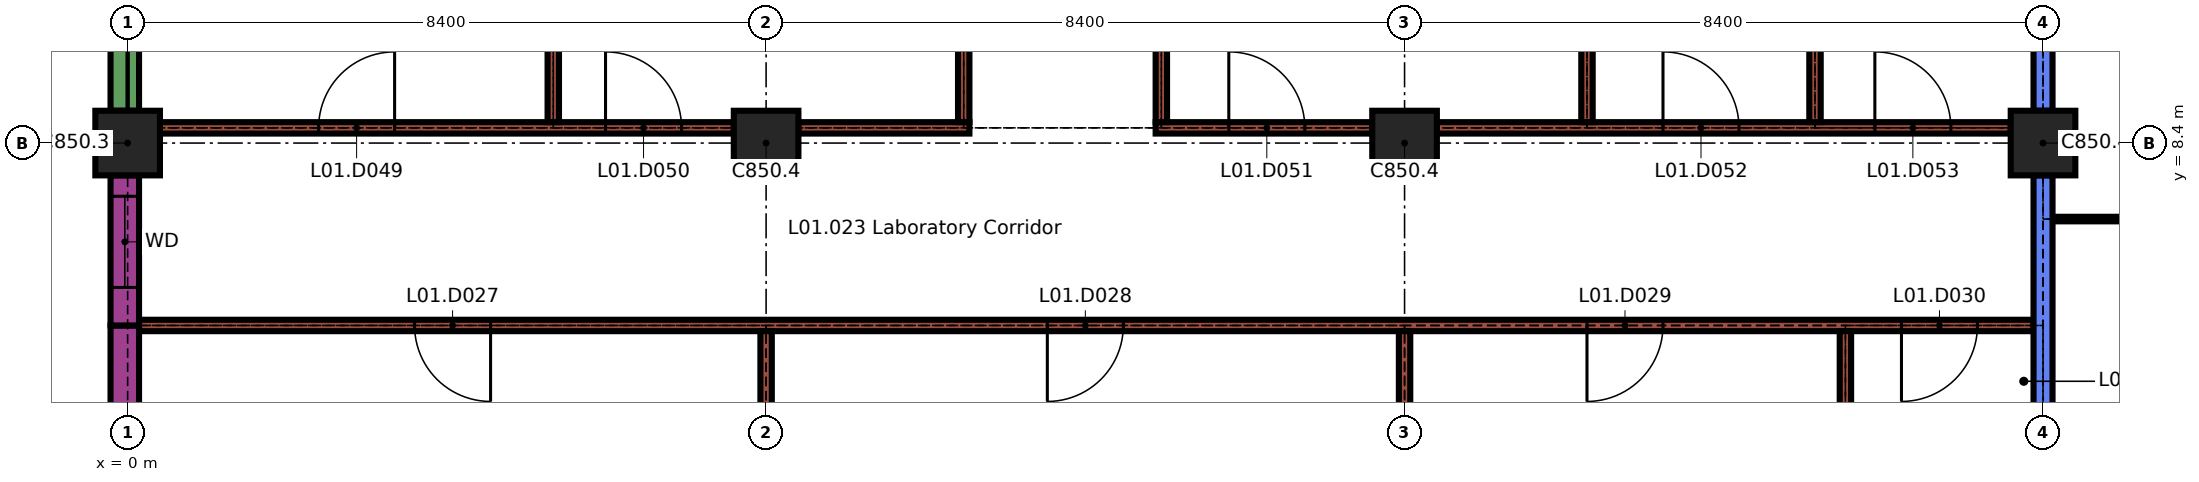
"""IFC4 building model, lengths in metres.
Left out: names, types, materials, properties, quantities, classifications, styles, units other than length and angle.
Written with IfcOpenShell. Run it as: python <this file> out.ifc"""

import sys

from ifc_helpers import new_model, si_unit, direction, frame, frame_2d, origin, origin_2d, place, context, subcontext, project, spatial, rectangle, extrude, element, fill, save


model = new_model("IFC4")
c1 = context("Model", 3, precision=1e-05, world=origin(), true_north=direction((0.0, 1.0)))
c2 = subcontext(c1, "Body", "Model", "MODEL_VIEW")
j1 = project(units=[si_unit("LENGTHUNIT", "METRE"), si_unit("PLANEANGLEUNIT", "RADIAN")], contexts=[c1])
p1 = place(None, origin())
s1 = spatial("IfcSite", under=j1, at=p1, CompositionType="ELEMENT")
p2 = place(p1, origin())
s2 = spatial("IfcBuilding", under=s1, at=p2, CompositionType="ELEMENT")
p3 = place(p2, frame((0.0, 0.0, 4.5)))
s3 = spatial("IfcBuildingStorey", under=s2, at=p3, CompositionType="ELEMENT", Elevation=4.5)
for number, where, z_axis, x_axis in (
    (1, (0.0, 8.4, 0.0), (0.0, 0.0, 1.0), (1.0, 0.0, 0.0)),
    (2, (8.4, 8.4, 0.0), (0.0, 0.0, 1.0), (1.0, 0.0, 0.0)),
    (3, (16.8, 8.4, 0.0), (0.0, 0.0, 1.0), (1.0, 0.0, 0.0)),
    (4, (25.2, 8.4, 0.0), (0.0, 0.0, 1.0), (1.0, 0.0, 0.0)),
):
    element("IfcColumn", number, at=place(p3, frame(where, z_axis=z_axis, x_axis=x_axis)), inside=s3, PredefinedType="COLUMN", context=c2, shape_type="SweptSolid", body=[
        extrude(rectangle(XDim=0.85, YDim=0.85, at=origin_2d()), origin(), (0.0, 0.0, 1.0), 3.45),
    ])
p4 = place(p3, frame((-0.038, 0.425, 0.0), z_axis=(0.0, 0.0, 1.0), x_axis=(0.0, 1.0, 0.0)))
e5 = element("IfcWall", 5, at=p4, inside=s3, PredefinedType="SOLIDWALL", context=c2, shape_type="SweptSolid", body=[
    extrude(rectangle(XDim=5.575, YDim=0.375, at=frame_2d((2.788, 0.0))), origin(), (0.0, 0.0, 1.0), 3.15),
])
p5 = place(p4, frame((0.275, 0.0, 1.0)))
e6 = element("IfcOpeningElement", 6, at=p5, cuts=e5, PredefinedType="OPENING", context=c2, shape_type="SweptSolid", body=[
    extrude(rectangle(XDim=2.8, YDim=1.2, at=frame_2d((1.4, 0.6))), frame((0.0, 0.198, 0.0), z_axis=(0.0, -1.0, 0.0), x_axis=(1.0, 0.0, 0.0)), (0.0, 0.0, 1.0), 0.395),
])
p6 = place(p3, frame((-0.038, 6.0, 0.0), z_axis=(0.0, 0.0, 1.0), x_axis=(0.0, 1.0, 0.0)))
e7 = element("IfcWall", 7, at=p6, inside=s3, PredefinedType="SOLIDWALL", context=c2, shape_type="SweptSolid", body=[
    extrude(rectangle(XDim=1.975, YDim=0.375, at=frame_2d((0.988, 0.0))), origin(), (0.0, 0.0, 1.0), 3.15),
])
p7 = place(p6, frame((0.5, 0.0, 0.9)))
e8 = element("IfcOpeningElement", 8, at=p7, cuts=e7, PredefinedType="OPENING", context=c2, shape_type="SweptSolid", body=[
    extrude(rectangle(XDim=1.2, YDim=1.5, at=frame_2d((0.6, 0.75))), frame((0.0, 0.198, 0.0), z_axis=(0.0, -1.0, 0.0), x_axis=(1.0, 0.0, 0.0)), (0.0, 0.0, 1.0), 0.395),
])
p8 = place(p3, frame((-0.038, 8.825, 0.0), z_axis=(0.0, 0.0, 1.0), x_axis=(0.0, 1.0, 0.0)))
e9 = element("IfcWall", 9, at=p8, inside=s3, PredefinedType="SOLIDWALL", context=c2, shape_type="SweptSolid", body=[
    extrude(rectangle(XDim=5.375, YDim=0.375, at=frame_2d((2.688, 0.0))), origin(), (0.0, 0.0, 1.0), 0.45),
])
p9 = place(p3, frame((0.15, 6.0, 0.0), z_axis=(0.0, 0.0, 1.0), x_axis=(1.0, 0.0, 0.0)))
e10 = element("IfcWall", 10, at=p9, inside=s3, PredefinedType="PARTITIONING", context=c2, shape_type="SweptSolid", body=[
    extrude(rectangle(XDim=24.925, YDim=0.15, at=frame_2d((12.462, 0.0))), origin(), (0.0, 0.0, 1.0), 3.45),
])
p10 = place(p9, frame((3.625, 0.0, 0.0)))
e11 = element("IfcOpeningElement", 11, at=p10, cuts=e10, PredefinedType="OPENING", context=c2, shape_type="SweptSolid", body=[
    extrude(rectangle(XDim=1.0, YDim=2.1, at=frame_2d((0.5, 1.05))), frame((0.0, 0.085, 0.0), z_axis=(0.0, -1.0, 0.0), x_axis=(1.0, 0.0, 0.0)), (0.0, 0.0, 1.0), 0.17),
])
p11 = place(p9, frame((11.95, 0.0, 0.0)))
e12 = element("IfcOpeningElement", 12, at=p11, cuts=e10, PredefinedType="OPENING", context=c2, shape_type="SweptSolid", body=[
    extrude(rectangle(XDim=1.0, YDim=2.1, at=frame_2d((0.5, 1.05))), frame((0.0, 0.085, 0.0), z_axis=(0.0, -1.0, 0.0), x_axis=(1.0, 0.0, 0.0)), (0.0, 0.0, 1.0), 0.17),
])
p12 = place(p9, frame((19.05, 0.0, 0.0)))
e13 = element("IfcOpeningElement", 13, at=p12, cuts=e10, PredefinedType="OPENING", context=c2, shape_type="SweptSolid", body=[
    extrude(rectangle(XDim=1.0, YDim=2.1, at=frame_2d((0.5, 1.05))), frame((0.0, 0.085, 0.0), z_axis=(0.0, -1.0, 0.0), x_axis=(1.0, 0.0, 0.0)), (0.0, 0.0, 1.0), 0.17),
])
p13 = place(p9, frame((23.188, 0.0, 0.0)))
e14 = element("IfcOpeningElement", 14, at=p13, cuts=e10, PredefinedType="OPENING", context=c2, shape_type="SweptSolid", body=[
    extrude(rectangle(XDim=1.0, YDim=2.1, at=frame_2d((0.5, 1.05))), frame((0.0, 0.085, 0.0), z_axis=(0.0, -1.0, 0.0), x_axis=(1.0, 0.0, 0.0)), (0.0, 0.0, 1.0), 0.17),
])
p14 = place(p3, frame((25.325, 7.4, 0.0), z_axis=(0.0, 0.0, 1.0), x_axis=(1.0, 0.0, 0.0)))
e15 = element("IfcWall", 15, at=p14, inside=s3, PredefinedType="PARTITIONING", context=c2, shape_type="SweptSolid", body=[
    extrude(rectangle(XDim=8.175, YDim=0.06, at=frame_2d((4.087, 0.0))), origin(), (0.0, 0.0, 1.0), 3.45),
])
p15 = place(p14, frame((3.587, 0.0, 0.0)))
e16 = element("IfcOpeningElement", 16, at=p15, cuts=e15, PredefinedType="OPENING", context=c2, shape_type="SweptSolid", body=[
    extrude(rectangle(XDim=1.0, YDim=2.1, at=frame_2d((0.5, 1.05))), frame((0.0, 0.04, 0.0), z_axis=(0.0, -1.0, 0.0), x_axis=(1.0, 0.0, 0.0)), (0.0, 0.0, 1.0), 0.08),
])
p16 = place(p3, frame((0.425, 8.6, 0.0), z_axis=(0.0, 0.0, 1.0), x_axis=(1.0, 0.0, 0.0)))
e17 = element("IfcWall", 17, at=p16, inside=s3, PredefinedType="PARTITIONING", context=c2, shape_type="SweptSolid", body=[
    extrude(rectangle(XDim=7.55, YDim=0.15, at=frame_2d((3.775, 0.0))), origin(), (0.0, 0.0, 1.0), 3.45),
])
p17 = place(p16, frame((2.087, 0.0, 0.0)))
e18 = element("IfcOpeningElement", 18, at=p17, cuts=e17, PredefinedType="OPENING", context=c2, shape_type="SweptSolid", body=[
    extrude(rectangle(XDim=1.0, YDim=2.1, at=frame_2d((0.5, 1.05))), frame((0.0, 0.085, 0.0), z_axis=(0.0, -1.0, 0.0), x_axis=(1.0, 0.0, 0.0)), (0.0, 0.0, 1.0), 0.17),
])
p18 = place(p16, frame((5.863, 0.0, 0.0)))
e19 = element("IfcOpeningElement", 19, at=p18, cuts=e17, PredefinedType="OPENING", context=c2, shape_type="SweptSolid", body=[
    extrude(rectangle(XDim=1.0, YDim=2.1, at=frame_2d((0.5, 1.05))), frame((0.0, 0.085, 0.0), z_axis=(0.0, -1.0, 0.0), x_axis=(1.0, 0.0, 0.0)), (0.0, 0.0, 1.0), 0.17),
])
p19 = place(p3, frame((8.825, 8.6, 0.0), z_axis=(0.0, 0.0, 1.0), x_axis=(1.0, 0.0, 0.0)))
e20 = element("IfcWall", 20, at=p19, inside=s3, PredefinedType="PARTITIONING", context=c2, shape_type="SweptSolid", body=[
    extrude(rectangle(XDim=2.25, YDim=0.15, at=frame_2d((1.125, 0.0))), origin(), (0.0, 0.0, 1.0), 3.45),
])
p20 = place(p3, frame((13.525, 8.6, 0.0), z_axis=(0.0, 0.0, 1.0), x_axis=(1.0, 0.0, 0.0)))
e21 = element("IfcWall", 21, at=p20, inside=s3, PredefinedType="PARTITIONING", context=c2, shape_type="SweptSolid", body=[
    extrude(rectangle(XDim=2.85, YDim=0.15, at=frame_2d((1.425, 0.0))), origin(), (0.0, 0.0, 1.0), 3.45),
])
p21 = place(p20, frame((0.962, 0.0, 0.0)))
e22 = element("IfcOpeningElement", 22, at=p21, cuts=e21, PredefinedType="OPENING", context=c2, shape_type="SweptSolid", body=[
    extrude(rectangle(XDim=1.0, YDim=2.1, at=frame_2d((0.5, 1.05))), frame((0.0, 0.085, 0.0), z_axis=(0.0, -1.0, 0.0), x_axis=(1.0, 0.0, 0.0)), (0.0, 0.0, 1.0), 0.17),
])
p22 = place(p3, frame((17.225, 8.6, 0.0), z_axis=(0.0, 0.0, 1.0), x_axis=(1.0, 0.0, 0.0)))
e23 = element("IfcWall", 23, at=p22, inside=s3, PredefinedType="PARTITIONING", context=c2, shape_type="SweptSolid", body=[
    extrude(rectangle(XDim=7.55, YDim=0.15, at=frame_2d((3.775, 0.0))), origin(), (0.0, 0.0, 1.0), 3.45),
])
p23 = place(p22, frame((2.975, 0.0, 0.0)))
e24 = element("IfcOpeningElement", 24, at=p23, cuts=e23, PredefinedType="OPENING", context=c2, shape_type="SweptSolid", body=[
    extrude(rectangle(XDim=1.0, YDim=2.1, at=frame_2d((0.5, 1.05))), frame((0.0, 0.085, 0.0), z_axis=(0.0, -1.0, 0.0), x_axis=(1.0, 0.0, 0.0)), (0.0, 0.0, 1.0), 0.17),
])
p24 = place(p22, frame((5.762, 0.0, 0.0)))
e25 = element("IfcOpeningElement", 25, at=p24, cuts=e23, PredefinedType="OPENING", context=c2, shape_type="SweptSolid", body=[
    extrude(rectangle(XDim=1.0, YDim=2.1, at=frame_2d((0.5, 1.05))), frame((0.0, 0.085, 0.0), z_axis=(0.0, -1.0, 0.0), x_axis=(1.0, 0.0, 0.0)), (0.0, 0.0, 1.0), 0.17),
])
p25 = place(p3, frame((5.6, 8.675, 0.0), z_axis=(0.0, 0.0, 1.0), x_axis=(0.0, 1.0, 0.0)))
e26 = element("IfcWall", 26, at=p25, inside=s3, PredefinedType="PARTITIONING", context=c2, shape_type="SweptSolid", body=[
    extrude(rectangle(XDim=5.45, YDim=0.15, at=frame_2d((2.725, 0.0))), origin(), (0.0, 0.0, 1.0), 3.45),
])
p26 = place(p3, frame((8.4, 0.425, 0.0), z_axis=(0.0, 0.0, 1.0), x_axis=(0.0, 1.0, 0.0)))
e27 = element("IfcWall", 27, at=p26, inside=s3, PredefinedType="PARTITIONING", context=c2, shape_type="SweptSolid", body=[
    extrude(rectangle(XDim=5.5, YDim=0.15, at=frame_2d((2.75, 0.0))), origin(), (0.0, 0.0, 1.0), 3.45),
])
p27 = place(p3, frame((11.0, 8.675, 0.0), z_axis=(0.0, 0.0, 1.0), x_axis=(0.0, 1.0, 0.0)))
e28 = element("IfcWall", 28, at=p27, inside=s3, PredefinedType="PARTITIONING", context=c2, shape_type="SweptSolid", body=[
    extrude(rectangle(XDim=5.45, YDim=0.15, at=frame_2d((2.725, 0.0))), origin(), (0.0, 0.0, 1.0), 3.45),
])
p28 = place(p3, frame((13.6, 8.675, 0.0), z_axis=(0.0, 0.0, 1.0), x_axis=(0.0, 1.0, 0.0)))
e29 = element("IfcWall", 29, at=p28, inside=s3, PredefinedType="PARTITIONING", context=c2, shape_type="SweptSolid", body=[
    extrude(rectangle(XDim=5.45, YDim=0.15, at=frame_2d((2.725, 0.0))), origin(), (0.0, 0.0, 1.0), 3.45),
])
p29 = place(p28, frame((2.425, 0.0, 0.9)))
e30 = element("IfcOpeningElement", 30, at=p29, cuts=e29, PredefinedType="OPENING", context=c2, shape_type="SweptSolid", body=[
    extrude(rectangle(XDim=0.6, YDim=0.6, at=frame_2d((0.3, 0.3))), frame((0.0, 0.085, 0.0), z_axis=(0.0, -1.0, 0.0), x_axis=(1.0, 0.0, 0.0)), (0.0, 0.0, 1.0), 0.17),
])
p30 = place(p3, frame((16.8, 0.425, 0.0), z_axis=(0.0, 0.0, 1.0), x_axis=(0.0, 1.0, 0.0)))
e31 = element("IfcWall", 31, at=p30, inside=s3, PredefinedType="PARTITIONING", context=c2, shape_type="SweptSolid", body=[
    extrude(rectangle(XDim=5.5, YDim=0.15, at=frame_2d((2.75, 0.0))), origin(), (0.0, 0.0, 1.0), 3.45),
])
for number, where, z_axis, x_axis in (
    (32, (19.2, 8.675, 0.0), (0.0, 0.0, 1.0), (0.0, 1.0, 0.0)),
    (33, (22.2, 8.675, 0.0), (0.0, 0.0, 1.0), (0.0, 1.0, 0.0)),
):
    element("IfcWall", number, at=place(p3, frame(where, z_axis=z_axis, x_axis=x_axis)), inside=s3, PredefinedType="PARTITIONING", context=c2, shape_type="SweptSolid", body=[
        extrude(rectangle(XDim=5.45, YDim=0.15, at=frame_2d((2.725, 0.0))), origin(), (0.0, 0.0, 1.0), 3.45),
    ])
p31 = place(p3, frame((22.6, 0.15, 0.0), z_axis=(0.0, 0.0, 1.0), x_axis=(0.0, 1.0, 0.0)))
e34 = element("IfcWall", 34, at=p31, inside=s3, PredefinedType="PARTITIONING", context=c2, shape_type="SweptSolid", body=[
    extrude(rectangle(XDim=5.775, YDim=0.15, at=frame_2d((2.888, 0.0))), origin(), (0.0, 0.0, 1.0), 3.45),
])
p32 = place(p3, frame((25.2, 0.425, 0.0), z_axis=(0.0, 0.0, 1.0), x_axis=(0.0, 1.0, 0.0)))
e35 = element("IfcWall", 35, at=p32, inside=s3, PredefinedType="SOLIDWALL", context=c2, shape_type="SweptSolid", body=[
    extrude(rectangle(XDim=7.55, YDim=0.25, at=frame_2d((3.775, 0.0))), origin(), (0.0, 0.0, 1.0), 3.45),
])
p33 = place(p3, frame((25.2, 8.825, 0.0), z_axis=(0.0, 0.0, 1.0), x_axis=(0.0, 1.0, 0.0)))
e36 = element("IfcWall", 36, at=p33, inside=s3, PredefinedType="SOLIDWALL", context=c2, shape_type="SweptSolid", body=[
    extrude(rectangle(XDim=5.3, YDim=0.25, at=frame_2d((2.65, 0.0))), origin(), (0.0, 0.0, 1.0), 3.45),
])
p34 = place(p7, origin())
e37 = element("IfcWindow", 37, at=p34, inside=s3, PartitioningType="SINGLE_PANEL", PredefinedType="WINDOW", context=c2, shape_type="SweptSolid", body=[
    extrude(rectangle(XDim=1.2, YDim=1.5, at=frame_2d((0.6, 0.75))), frame((0.0, 0.03, 0.0), z_axis=(0.0, -1.0, 0.0), x_axis=(1.0, 0.0, 0.0)), (0.0, 0.0, 1.0), 0.06),
])
fill(e8, e37)
p35 = place(p10, origin())
e38 = element("IfcDoor", 38, at=p35, inside=s3, OperationType="SINGLE_SWING_RIGHT", PredefinedType="DOOR", context=c2, shape_type="SweptSolid", body=[
    extrude(rectangle(XDim=1.0, YDim=2.1, at=frame_2d((0.5, 1.05))), frame((0.0, 0.025, 0.0), z_axis=(0.0, -1.0, 0.0), x_axis=(1.0, 0.0, 0.0)), (0.0, 0.0, 1.0), 0.05),
])
fill(e11, e38)
p36 = place(p11, origin())
e39 = element("IfcDoor", 39, at=p36, inside=s3, OperationType="SINGLE_SWING_LEFT", PredefinedType="DOOR", context=c2, shape_type="SweptSolid", body=[
    extrude(rectangle(XDim=1.0, YDim=2.1, at=frame_2d((0.5, 1.05))), frame((0.0, 0.025, 0.0), z_axis=(0.0, -1.0, 0.0), x_axis=(1.0, 0.0, 0.0)), (0.0, 0.0, 1.0), 0.05),
])
fill(e12, e39)
p37 = place(p12, origin())
e40 = element("IfcDoor", 40, at=p37, inside=s3, OperationType="SINGLE_SWING_LEFT", PredefinedType="DOOR", context=c2, shape_type="SweptSolid", body=[
    extrude(rectangle(XDim=1.0, YDim=2.1, at=frame_2d((0.5, 1.05))), frame((0.0, 0.025, 0.0), z_axis=(0.0, -1.0, 0.0), x_axis=(1.0, 0.0, 0.0)), (0.0, 0.0, 1.0), 0.05),
])
fill(e13, e40)
p38 = place(p13, origin())
e41 = element("IfcDoor", 41, at=p38, inside=s3, OperationType="SINGLE_SWING_LEFT", PredefinedType="DOOR", context=c2, shape_type="SweptSolid", body=[
    extrude(rectangle(XDim=1.0, YDim=2.1, at=frame_2d((0.5, 1.05))), frame((0.0, 0.05, 0.0), z_axis=(0.0, -1.0, 0.0), x_axis=(1.0, 0.0, 0.0)), (0.0, 0.0, 1.0), 0.1),
])
fill(e14, e41)
p39 = place(p17, origin())
e42 = element("IfcDoor", 42, at=p39, inside=s3, OperationType="SINGLE_SWING_LEFT", PredefinedType="DOOR", context=c2, shape_type="SweptSolid", body=[
    extrude(rectangle(XDim=1.0, YDim=2.1, at=frame_2d((0.5, 1.05))), frame((0.0, 0.025, 0.0), z_axis=(0.0, -1.0, 0.0), x_axis=(1.0, 0.0, 0.0)), (0.0, 0.0, 1.0), 0.05),
])
fill(e18, e42)
p40 = place(p18, origin())
e43 = element("IfcDoor", 43, at=p40, inside=s3, OperationType="SINGLE_SWING_RIGHT", PredefinedType="DOOR", context=c2, shape_type="SweptSolid", body=[
    extrude(rectangle(XDim=1.0, YDim=2.1, at=frame_2d((0.5, 1.05))), frame((0.0, 0.025, 0.0), z_axis=(0.0, -1.0, 0.0), x_axis=(1.0, 0.0, 0.0)), (0.0, 0.0, 1.0), 0.05),
])
fill(e19, e43)
p41 = place(p21, origin())
e44 = element("IfcDoor", 44, at=p41, inside=s3, OperationType="SINGLE_SWING_RIGHT", PredefinedType="DOOR", context=c2, shape_type="SweptSolid", body=[
    extrude(rectangle(XDim=1.0, YDim=2.1, at=frame_2d((0.5, 1.05))), frame((0.0, 0.025, 0.0), z_axis=(0.0, -1.0, 0.0), x_axis=(1.0, 0.0, 0.0)), (0.0, 0.0, 1.0), 0.05),
])
fill(e22, e44)
p42 = place(p23, origin())
e45 = element("IfcDoor", 45, at=p42, inside=s3, OperationType="SINGLE_SWING_RIGHT", PredefinedType="DOOR", context=c2, shape_type="SweptSolid", body=[
    extrude(rectangle(XDim=1.0, YDim=2.1, at=frame_2d((0.5, 1.05))), frame((0.0, 0.025, 0.0), z_axis=(0.0, -1.0, 0.0), x_axis=(1.0, 0.0, 0.0)), (0.0, 0.0, 1.0), 0.05),
])
fill(e24, e45)
p43 = place(p24, origin())
e46 = element("IfcDoor", 46, at=p43, inside=s3, OperationType="SINGLE_SWING_RIGHT", PredefinedType="DOOR", context=c2, shape_type="SweptSolid", body=[
    extrude(rectangle(XDim=1.0, YDim=2.1, at=frame_2d((0.5, 1.05))), frame((0.0, 0.025, 0.0), z_axis=(0.0, -1.0, 0.0), x_axis=(1.0, 0.0, 0.0)), (0.0, 0.0, 1.0), 0.05),
])
fill(e25, e46)
save(model, sys.argv[1])
